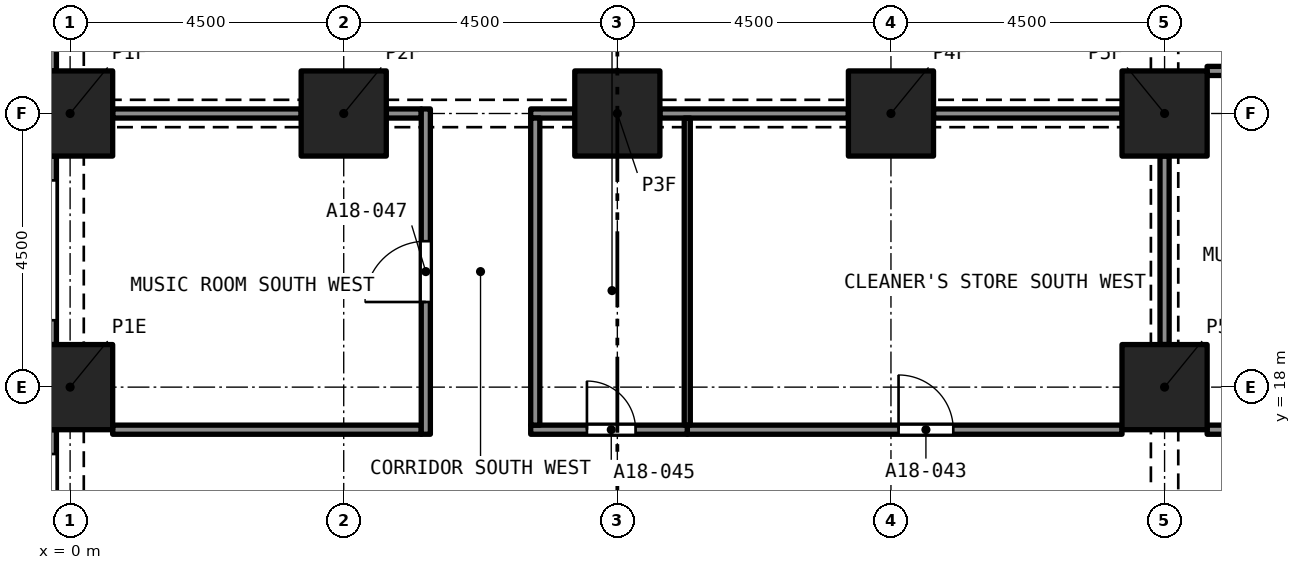
"""IFC4 building model, lengths in metres.
Left out: names, types, materials, properties, quantities, classifications, styles, units other than length and angle.
Written with IfcOpenShell. Run it as: python <this file> out.ifc"""

import sys

from ifc_helpers import new_model, si_unit, direction, frame, frame_2d, origin, origin_2d, place, context, subcontext, project, spatial, rectangle, extrude, element, fill, save


model = new_model("IFC4")
c1 = context("Model", 3, precision=1e-05, world=origin(), true_north=direction((0.0, 1.0)))
c2 = subcontext(c1, "Body", "Model", "MODEL_VIEW")
j1 = project(units=[si_unit("LENGTHUNIT", "METRE"), si_unit("PLANEANGLEUNIT", "RADIAN")], contexts=[c1])
p1 = place(None, origin())
s1 = spatial("IfcSite", under=j1, at=p1, CompositionType="ELEMENT")
p2 = place(p1, origin())
s2 = spatial("IfcBuilding", under=s1, at=p2, CompositionType="ELEMENT")
p3 = place(p2, frame((0.0, 0.0, 68.8)))
s3 = spatial("IfcBuildingStorey", under=s2, at=p3, CompositionType="ELEMENT", Elevation=68.8)
for number, where, z_axis, x_axis in (
    (1, (0.0, 18.0, 0.0), (0.0, 0.0, 1.0), (1.0, 0.0, 0.0)),
    (2, (18.0, 18.0, 0.0), (0.0, 0.0, 1.0), (1.0, 0.0, 0.0)),
    (3, (0.0, 22.5, 0.0), (0.0, 0.0, 1.0), (1.0, 0.0, 0.0)),
    (4, (4.5, 22.5, 0.0), (0.0, 0.0, 1.0), (1.0, 0.0, 0.0)),
    (5, (9.0, 22.5, 0.0), (0.0, 0.0, 1.0), (1.0, 0.0, 0.0)),
    (6, (13.5, 22.5, 0.0), (0.0, 0.0, 1.0), (1.0, 0.0, 0.0)),
    (7, (18.0, 22.5, 0.0), (0.0, 0.0, 1.0), (1.0, 0.0, 0.0)),
):
    element("IfcColumn", number, at=place(p3, frame(where, z_axis=z_axis, x_axis=x_axis)), inside=s3, PredefinedType="COLUMN", context=c2, shape_type="SweptSolid", body=[
        extrude(rectangle(XDim=1.4, YDim=1.4, at=origin_2d()), origin(), (0.0, 0.0, 1.0), 3.2),
    ])
p4 = place(p3, frame((-0.375, 23.2, 0.0), z_axis=(0.0, 0.0, 1.0), x_axis=(0.0, 1.0, 0.0)))
e8 = element("IfcWall", 8, at=p4, inside=s3, PredefinedType="SOLIDWALL", context=c2, shape_type="SweptSolid", body=[
    extrude(rectangle(XDim=3.1, YDim=0.3, at=frame_2d((1.55, 0.0))), origin(), (0.0, 0.0, 1.0), 3.2),
])
p5 = place(p4, frame((0.4, 0.0, 0.45)))
e9 = element("IfcOpeningElement", 9, at=p5, cuts=e8, PredefinedType="OPENING", context=c2, shape_type="SweptSolid", body=[
    extrude(rectangle(XDim=2.3, YDim=1.95, at=frame_2d((1.15, 0.975))), frame((0.0, 0.16, 0.0), z_axis=(0.0, -1.0, 0.0), x_axis=(1.0, 0.0, 0.0)), (0.0, 0.0, 1.0), 0.32),
])
p6 = place(p3, frame((-0.375, 18.7, 0.0), z_axis=(0.0, 0.0, 1.0), x_axis=(0.0, 1.0, 0.0)))
e10 = element("IfcWall", 10, at=p6, inside=s3, PredefinedType="SOLIDWALL", context=c2, shape_type="SweptSolid", body=[
    extrude(rectangle(XDim=3.1, YDim=0.3, at=frame_2d((1.55, 0.0))), origin(), (0.0, 0.0, 1.0), 3.2),
])
p7 = place(p6, frame((0.4, 0.0, 0.45)))
e11 = element("IfcOpeningElement", 11, at=p7, cuts=e10, PredefinedType="OPENING", context=c2, shape_type="SweptSolid", body=[
    extrude(rectangle(XDim=2.3, YDim=1.95, at=frame_2d((1.15, 0.975))), frame((0.0, 0.16, 0.0), z_axis=(0.0, -1.0, 0.0), x_axis=(1.0, 0.0, 0.0)), (0.0, 0.0, 1.0), 0.32),
])
p8 = place(p3, frame((-0.375, 14.2, 0.0), z_axis=(0.0, 0.0, 1.0), x_axis=(0.0, 1.0, 0.0)))
e12 = element("IfcWall", 12, at=p8, inside=s3, PredefinedType="SOLIDWALL", context=c2, shape_type="SweptSolid", body=[
    extrude(rectangle(XDim=3.1, YDim=0.3, at=frame_2d((1.55, 0.0))), origin(), (0.0, 0.0, 1.0), 3.2),
])
p9 = place(p8, frame((0.4, 0.0, 0.45)))
e13 = element("IfcOpeningElement", 13, at=p9, cuts=e12, PredefinedType="OPENING", context=c2, shape_type="SweptSolid", body=[
    extrude(rectangle(XDim=2.3, YDim=1.95, at=frame_2d((1.15, 0.975))), frame((0.0, 0.16, 0.0), z_axis=(0.0, -1.0, 0.0), x_axis=(1.0, 0.0, 0.0)), (0.0, 0.0, 1.0), 0.32),
])
p10 = place(p3, frame((18.7, 17.3, 0.0), z_axis=(0.0, 0.0, 1.0), x_axis=(1.0, 0.0, 0.0)))
e14 = element("IfcWall", 14, at=p10, inside=s3, PredefinedType="PARTITIONING", context=c2, shape_type="SweptSolid", body=[
    extrude(rectangle(XDim=5.075, YDim=0.15, at=frame_2d((2.538, 0.0))), origin(), (0.0, 0.0, 1.0), 2.75),
])
p11 = place(p3, frame((10.15, 17.3, 0.0), z_axis=(0.0, 0.0, 1.0), x_axis=(1.0, 0.0, 0.0)))
e15 = element("IfcWall", 15, at=p11, inside=s3, PredefinedType="PARTITIONING", context=c2, shape_type="SweptSolid", body=[
    extrude(rectangle(XDim=7.15, YDim=0.15, at=frame_2d((3.575, 0.0))), origin(), (0.0, 0.0, 1.0), 2.9),
])
p12 = place(p11, frame((3.475, 0.0, 0.0)))
e16 = element("IfcOpeningElement", 16, at=p12, cuts=e15, PredefinedType="OPENING", context=c2, shape_type="SweptSolid", body=[
    extrude(rectangle(XDim=0.9, YDim=2.1, at=frame_2d((0.45, 1.05))), frame((0.0, 0.085, 0.0), z_axis=(0.0, -1.0, 0.0), x_axis=(1.0, 0.0, 0.0)), (0.0, 0.0, 1.0), 0.17),
])
p13 = place(p3, frame((7.575, 17.3, 0.0), z_axis=(0.0, 0.0, 1.0), x_axis=(1.0, 0.0, 0.0)))
e17 = element("IfcWall", 17, at=p13, inside=s3, PredefinedType="PARTITIONING", context=c2, shape_type="SweptSolid", body=[
    extrude(rectangle(XDim=2.575, YDim=0.15, at=frame_2d((1.288, 0.0))), origin(), (0.0, 0.0, 1.0), 2.9),
])
p14 = place(p13, frame((0.925, 0.0, 0.0)))
e18 = element("IfcOpeningElement", 18, at=p14, cuts=e17, PredefinedType="OPENING", context=c2, shape_type="SweptSolid", body=[
    extrude(rectangle(XDim=0.8, YDim=2.1, at=frame_2d((0.4, 1.05))), frame((0.0, 0.085, 0.0), z_axis=(0.0, -1.0, 0.0), x_axis=(1.0, 0.0, 0.0)), (0.0, 0.0, 1.0), 0.17),
])
p15 = place(p3, frame((0.7, 17.3, 0.0), z_axis=(0.0, 0.0, 1.0), x_axis=(1.0, 0.0, 0.0)))
e19 = element("IfcWall", 19, at=p15, inside=s3, PredefinedType="PARTITIONING", context=c2, shape_type="SweptSolid", body=[
    extrude(rectangle(XDim=5.075, YDim=0.15, at=frame_2d((2.538, 0.0))), origin(), (0.0, 0.0, 1.0), 2.9),
])
p16 = place(p3, frame((18.7, 23.2, 0.0), z_axis=(0.0, 0.0, 1.0), x_axis=(1.0, 0.0, 0.0)))
e20 = element("IfcWall", 20, at=p16, inside=s3, PredefinedType="PARTITIONING", context=c2, shape_type="SweptSolid", body=[
    extrude(rectangle(XDim=5.075, YDim=0.15, at=frame_2d((2.538, 0.0))), origin(), (0.0, 0.0, 1.0), 2.75),
])
for number, where, z_axis, x_axis in (
    (21, (18.0, 18.7, 0.0), (0.0, 0.0, 1.0), (0.0, 1.0, 0.0)),
    (22, (14.2, 22.5, 0.0), (0.0, 0.0, 1.0), (1.0, 0.0, 0.0)),
    (23, (9.7, 22.5, 0.0), (0.0, 0.0, 1.0), (1.0, 0.0, 0.0)),
):
    element("IfcWall", number, at=place(p3, frame(where, z_axis=z_axis, x_axis=x_axis)), inside=s3, PredefinedType="PARTITIONING", context=c2, shape_type="SweptSolid", body=[
        extrude(rectangle(XDim=3.1, YDim=0.15, at=frame_2d((1.55, 0.0))), origin(), (0.0, 0.0, 1.0), 2.38),
    ])
p17 = place(p3, frame((7.575, 22.5, 0.0), z_axis=(0.0, 0.0, 1.0), x_axis=(1.0, 0.0, 0.0)))
e24 = element("IfcWall", 24, at=p17, inside=s3, PredefinedType="PARTITIONING", context=c2, shape_type="SweptSolid", body=[
    extrude(rectangle(XDim=0.725, YDim=0.15, at=frame_2d((0.363, 0.0))), origin(), (0.0, 0.0, 1.0), 2.38),
])
p18 = place(p3, frame((5.2, 22.5, 0.0), z_axis=(0.0, 0.0, 1.0), x_axis=(1.0, 0.0, 0.0)))
e25 = element("IfcWall", 25, at=p18, inside=s3, PredefinedType="PARTITIONING", context=c2, shape_type="SweptSolid", body=[
    extrude(rectangle(XDim=0.575, YDim=0.15, at=frame_2d((0.288, 0.0))), origin(), (0.0, 0.0, 1.0), 2.38),
])
p19 = place(p3, frame((0.7, 22.5, 0.0), z_axis=(0.0, 0.0, 1.0), x_axis=(1.0, 0.0, 0.0)))
e26 = element("IfcWall", 26, at=p19, inside=s3, PredefinedType="PARTITIONING", context=c2, shape_type="SweptSolid", body=[
    extrude(rectangle(XDim=3.1, YDim=0.15, at=frame_2d((1.55, 0.0))), origin(), (0.0, 0.0, 1.0), 2.38),
])
p20 = place(p3, frame((7.65, 17.375, 0.0), z_axis=(0.0, 0.0, 1.0), x_axis=(0.0, 1.0, 0.0)))
e27 = element("IfcWall", 27, at=p20, inside=s3, PredefinedType="PARTITIONING", context=c2, shape_type="SweptSolid", body=[
    extrude(rectangle(XDim=5.05, YDim=0.15, at=frame_2d((2.525, 0.0))), origin(), (0.0, 0.0, 1.0), 2.9),
])
p21 = place(p3, frame((5.85, 17.225, 0.0), z_axis=(0.0, 0.0, 1.0), x_axis=(0.0, 1.0, 0.0)))
e28 = element("IfcWall", 28, at=p21, inside=s3, PredefinedType="PARTITIONING", context=c2, shape_type="SweptSolid", body=[
    extrude(rectangle(XDim=5.35, YDim=0.15, at=frame_2d((2.675, 0.0))), origin(), (0.0, 0.0, 1.0), 2.9),
])
p22 = place(p21, frame((2.175, 0.0, 0.0)))
e29 = element("IfcOpeningElement", 29, at=p22, cuts=e28, PredefinedType="OPENING", context=c2, shape_type="SweptSolid", body=[
    extrude(rectangle(XDim=1.0, YDim=2.1, at=frame_2d((0.5, 1.05))), frame((0.0, 0.085, 0.0), z_axis=(0.0, -1.0, 0.0), x_axis=(1.0, 0.0, 0.0)), (0.0, 0.0, 1.0), 0.17),
])
p23 = place(p3, frame((10.15, 17.375, 0.0), z_axis=(0.0, 0.0, 1.0), x_axis=(0.0, 1.0, 0.0)))
e30 = element("IfcWall", 30, at=p23, inside=s3, PredefinedType="PARTITIONING", context=c2, shape_type="SweptSolid", body=[
    extrude(rectangle(XDim=5.05, YDim=0.1, at=frame_2d((2.525, 0.0))), origin(), (0.0, 0.0, 1.0), 2.9),
])
p24 = place(p12, origin())
e31 = element("IfcDoor", 31, at=p24, inside=s3, OperationType="SINGLE_SWING_RIGHT", PredefinedType="DOOR", context=c2, shape_type="SweptSolid", body=[
    extrude(rectangle(XDim=0.9, YDim=2.1, at=frame_2d((0.45, 1.05))), frame((0.0, 0.025, 0.0), z_axis=(0.0, -1.0, 0.0), x_axis=(1.0, 0.0, 0.0)), (0.0, 0.0, 1.0), 0.05),
])
fill(e16, e31)
p25 = place(p14, origin())
e32 = element("IfcDoor", 32, at=p25, inside=s3, OperationType="SINGLE_SWING_RIGHT", PredefinedType="DOOR", context=c2, shape_type="SweptSolid", body=[
    extrude(rectangle(XDim=0.8, YDim=2.1, at=frame_2d((0.4, 1.05))), frame((0.0, 0.025, 0.0), z_axis=(0.0, -1.0, 0.0), x_axis=(1.0, 0.0, 0.0)), (0.0, 0.0, 1.0), 0.05),
])
fill(e18, e32)
p26 = place(p22, origin())
e33 = element("IfcDoor", 33, at=p26, inside=s3, OperationType="SINGLE_SWING_LEFT", PredefinedType="DOOR", context=c2, shape_type="SweptSolid", body=[
    extrude(rectangle(XDim=1.0, YDim=2.1, at=frame_2d((0.5, 1.05))), frame((0.0, 0.025, 0.0), z_axis=(0.0, -1.0, 0.0), x_axis=(1.0, 0.0, 0.0)), (0.0, 0.0, 1.0), 0.05),
])
fill(e29, e33)
save(model, sys.argv[1])
